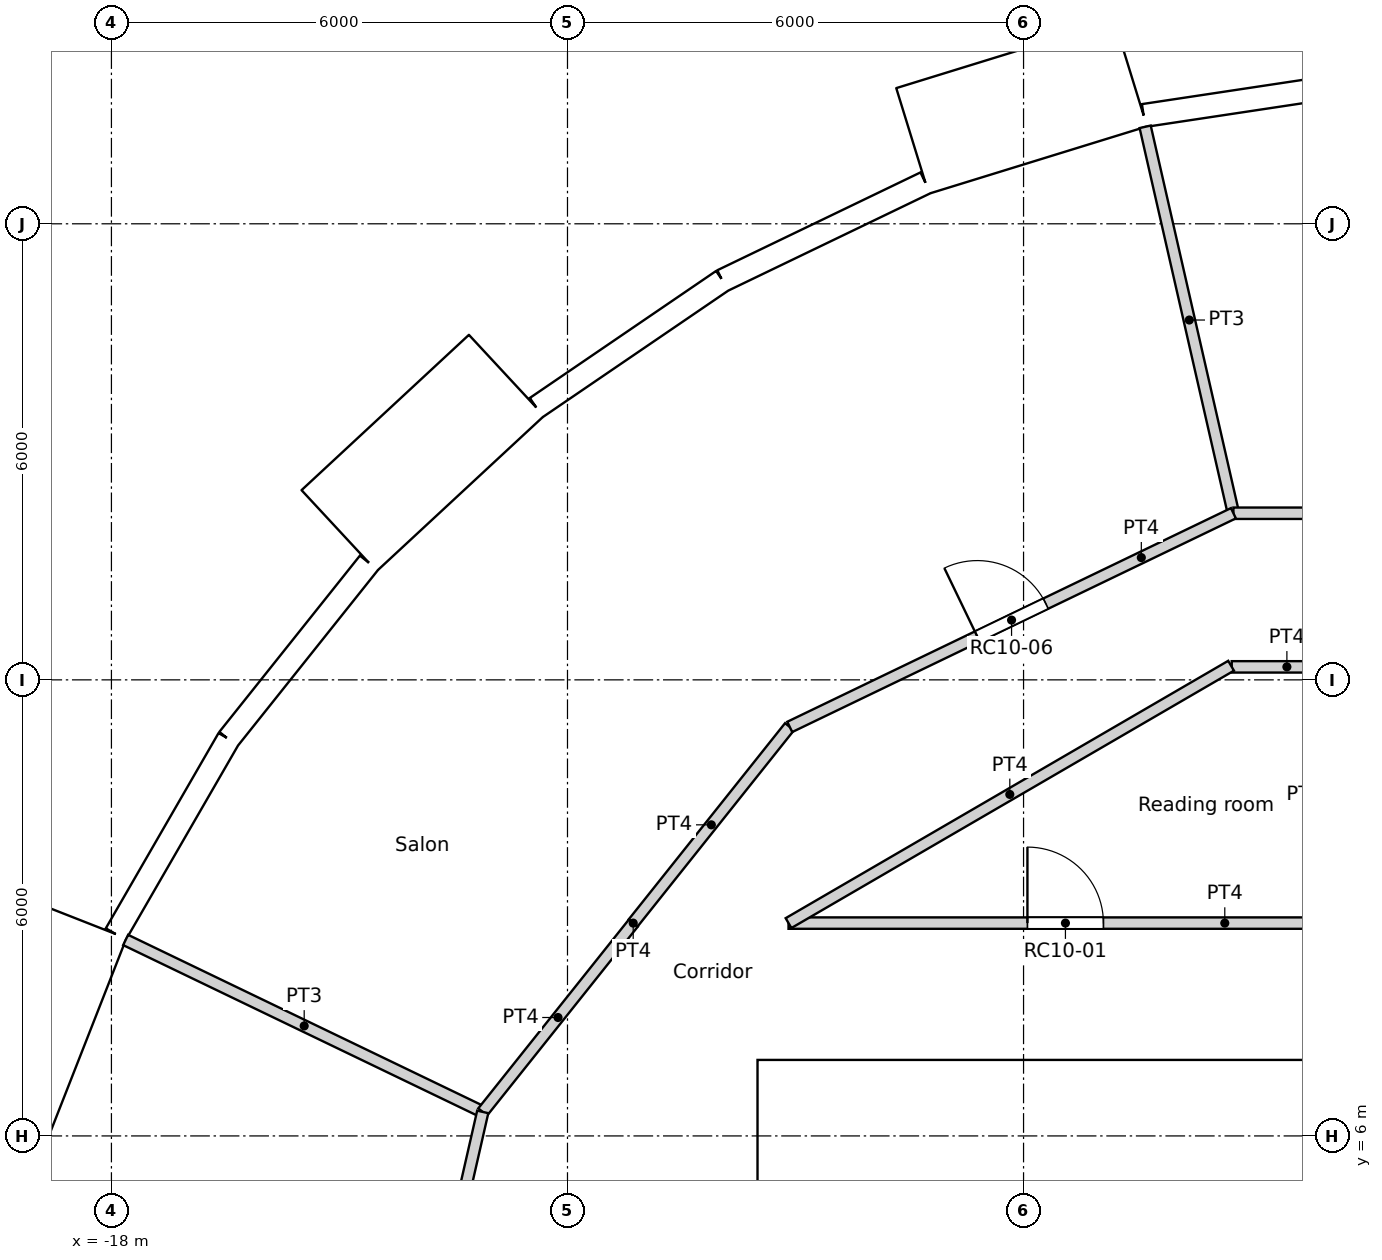
"""IFC4 building model, lengths in metres.
Left out: names, types, materials, properties, quantities, classifications, styles, units other than length and angle.
Written with IfcOpenShell. Run it as: python <this file> out.ifc"""

import sys

from ifc_helpers import new_model, si_unit, direction, frame, frame_2d, origin, origin_2d, place, context, subcontext, project, spatial, rectangle, circle, extrude, element, fill, save


model = new_model("IFC4")
c1 = context("Model", 3, precision=1e-05, world=origin(), true_north=direction((0.0, 1.0)))
c2 = subcontext(c1, "Body", "Model", "MODEL_VIEW")
j1 = project(units=[si_unit("LENGTHUNIT", "METRE"), si_unit("PLANEANGLEUNIT", "RADIAN")], contexts=[c1])
p1 = place(None, origin())
s1 = spatial("IfcSite", under=j1, at=p1, CompositionType="ELEMENT")
p2 = place(p1, origin())
s2 = spatial("IfcBuilding", under=s1, at=p2, CompositionType="ELEMENT")
p3 = place(p2, frame((0.0, 0.0, 323.4)))
s3 = spatial("IfcBuildingStorey", under=s2, at=p3, CompositionType="ELEMENT", Elevation=323.4)
for number, where, z_axis, x_axis in (
    (1, (-4.188, 18.35, 0.0), (0.0, 0.0, 1.0), (1.0, 0.0, 0.0)),
    (2, (-9.411, 16.301, 0.0), (0.0, 0.0, 1.0), (1.0, 0.0, 0.0)),
    (3, (-13.798, 12.802, 0.0), (0.0, 0.0, 1.0), (1.0, 0.0, 0.0)),
    (4, (-16.958, 8.167, 0.0), (0.0, 0.0, 1.0), (1.0, 0.0, 0.0)),
):
    element("IfcColumn", number, at=place(p3, frame(where, z_axis=z_axis, x_axis=x_axis)), inside=s3, PredefinedType="COLUMN", context=c2, shape_type="SweptSolid", body=[
        extrude(circle(Radius=0.45, at=origin_2d()), origin(), (0.0, 0.0, 1.0), 3.6),
    ])
p4 = place(p3, frame((-1.489, 19.866, 0.0), z_axis=(0.0, 0.0, 1.0), x_axis=(-0.988835775663, -0.149009425104, 0.0)))
e5 = element("IfcWall", 5, at=p4, inside=s3, PredefinedType="SOLIDWALL", context=c2, shape_type="SweptSolid", body=[
    extrude(rectangle(XDim=2.962, YDim=0.3, at=frame_2d((1.481, 0.0))), origin(), (0.0, 0.0, 1.0), 3.25),
])
p5 = place(p4, frame((1.481, 0.0, 1.55)))
e6 = element("IfcOpeningElement", 6, at=p5, cuts=e5, PredefinedType="OPENING", context=c2, shape_type="SweptSolid", body=[
    extrude(circle(Radius=0.9, at=origin_2d()), frame((0.0, 0.16, 0.0), z_axis=(0.0, -1.0, 0.0), x_axis=(1.0, 0.0, 0.0)), (0.0, 0.0, 1.0), 0.32),
])
p6 = place(p3, frame((-4.592, 19.975, -0.35), z_axis=(0.0, 0.0, 1.0), x_axis=(-0.955571139978, -0.294760574774, 0.0)))
e7 = element("IfcWall", 7, at=p6, inside=s3, PredefinedType="ELEMENTEDWALL", context=c2, shape_type="SweptSolid", body=[
    extrude(rectangle(XDim=3.0, YDim=1.45, at=frame_2d((1.5, 0.0))), origin(), (0.0, 0.0, 1.0), 3.6),
])
p7 = place(p6, frame((1.5, 0.0, 1.9)))
e8 = element("IfcOpeningElement", 8, at=p7, cuts=e7, PredefinedType="OPENING", context=c2, shape_type="SweptSolid", body=[
    extrude(circle(Radius=0.9, at=origin_2d()), frame((0.0, 0.735, 0.0), z_axis=(0.0, -1.0, 0.0), x_axis=(1.0, 0.0, 0.0)), (0.0, 0.0, 1.0), 1.47),
])
p8 = place(p3, frame((-7.292, 18.538, 0.0), z_axis=(0.0, 0.0, 1.0), x_axis=(-0.90095513435, -0.433912255978, 0.0)))
e9 = element("IfcWall", 9, at=p8, inside=s3, PredefinedType="SOLIDWALL", context=c2, shape_type="SweptSolid", body=[
    extrude(rectangle(XDim=2.962, YDim=0.3, at=frame_2d((1.481, 0.0))), origin(), (0.0, 0.0, 1.0), 3.25),
])
p9 = place(p8, frame((1.481, 0.0, 1.55)))
e10 = element("IfcOpeningElement", 10, at=p9, cuts=e9, PredefinedType="OPENING", context=c2, shape_type="SweptSolid", body=[
    extrude(circle(Radius=0.9, at=origin_2d()), frame((0.0, 0.16, 0.0), z_axis=(0.0, -1.0, 0.0), x_axis=(1.0, 0.0, 0.0)), (0.0, 0.0, 1.0), 0.32),
])
p10 = place(p3, frame((-9.961, 17.253, 0.0), z_axis=(0.0, 0.0, 1.0), x_axis=(-0.826236061068, -0.563324037646, 0.0)))
e11 = element("IfcWall", 11, at=p10, inside=s3, PredefinedType="SOLIDWALL", context=c2, shape_type="SweptSolid", body=[
    extrude(rectangle(XDim=2.962, YDim=0.3, at=frame_2d((1.481, 0.0))), origin(), (0.0, 0.0, 1.0), 3.25),
])
p11 = place(p10, frame((1.481, 0.0, 1.55)))
e12 = element("IfcOpeningElement", 12, at=p11, cuts=e11, PredefinedType="OPENING", context=c2, shape_type="SweptSolid", body=[
    extrude(circle(Radius=0.9, at=origin_2d()), frame((0.0, 0.16, 0.0), z_axis=(0.0, -1.0, 0.0), x_axis=(1.0, 0.0, 0.0)), (0.0, 0.0, 1.0), 0.32),
])
p12 = place(p3, frame((-12.804, 16.005, -0.35), z_axis=(0.0, 0.0, 1.0), x_axis=(-0.733022439167, -0.680204457261, 0.0)))
e13 = element("IfcWall", 13, at=p12, inside=s3, PredefinedType="ELEMENTEDWALL", context=c2, shape_type="SweptSolid", body=[
    extrude(rectangle(XDim=3.0, YDim=1.45, at=frame_2d((1.5, 0.0))), origin(), (0.0, 0.0, 1.0), 3.6),
])
p13 = place(p12, frame((1.5, 0.0, 1.9)))
e14 = element("IfcOpeningElement", 14, at=p13, cuts=e13, PredefinedType="OPENING", context=c2, shape_type="SweptSolid", body=[
    extrude(circle(Radius=0.9, at=origin_2d()), frame((0.0, 0.735, 0.0), z_axis=(0.0, -1.0, 0.0), x_axis=(1.0, 0.0, 0.0)), (0.0, 0.0, 1.0), 1.47),
])
p14 = place(p3, frame((-14.613, 13.538, 0.0), z_axis=(0.0, 0.0, 1.0), x_axis=(-0.623498236992, -0.781824755599, 0.0)))
e15 = element("IfcWall", 15, at=p14, inside=s3, PredefinedType="SOLIDWALL", context=c2, shape_type="SweptSolid", body=[
    extrude(rectangle(XDim=2.962, YDim=0.3, at=frame_2d((1.481, 0.0))), origin(), (0.0, 0.0, 1.0), 3.25),
])
p15 = place(p14, frame((1.481, 0.0, 1.55)))
e16 = element("IfcOpeningElement", 16, at=p15, cuts=e15, PredefinedType="OPENING", context=c2, shape_type="SweptSolid", body=[
    extrude(circle(Radius=0.9, at=origin_2d()), frame((0.0, 0.16, 0.0), z_axis=(0.0, -1.0, 0.0), x_axis=(1.0, 0.0, 0.0)), (0.0, 0.0, 1.0), 0.32),
])
p16 = place(p3, frame((-16.46, 11.222, 0.0), z_axis=(0.0, 0.0, 1.0), x_axis=(-0.499950756475, -0.86605383268, 0.0)))
e17 = element("IfcWall", 17, at=p16, inside=s3, PredefinedType="SOLIDWALL", context=c2, shape_type="SweptSolid", body=[
    extrude(rectangle(XDim=2.962, YDim=0.3, at=frame_2d((1.481, 0.0))), origin(), (0.0, 0.0, 1.0), 3.25),
])
p17 = place(p16, frame((1.481, 0.0, 1.55)))
e18 = element("IfcOpeningElement", 18, at=p17, cuts=e17, PredefinedType="OPENING", context=c2, shape_type="SweptSolid", body=[
    extrude(circle(Radius=0.9, at=origin_2d()), frame((0.0, 0.16, 0.0), z_axis=(0.0, -1.0, 0.0), x_axis=(1.0, 0.0, 0.0)), (0.0, 0.0, 1.0), 0.32),
])
p18 = place(p3, frame((-18.48, 8.864, -0.35), z_axis=(0.0, 0.0, 1.0), x_axis=(-0.36537792632, -0.93085926485, 0.0)))
e19 = element("IfcWall", 19, at=p18, inside=s3, PredefinedType="ELEMENTEDWALL", context=c2, shape_type="SweptSolid", body=[
    extrude(rectangle(XDim=3.0, YDim=1.45, at=frame_2d((1.5, 0.0))), origin(), (0.0, 0.0, 1.0), 3.6),
])
p19 = place(p18, frame((1.5, 0.0, 1.9)))
e20 = element("IfcOpeningElement", 20, at=p19, cuts=e19, PredefinedType="OPENING", context=c2, shape_type="SweptSolid", body=[
    extrude(circle(Radius=0.9, at=origin_2d()), frame((0.0, 0.735, 0.0), z_axis=(0.0, -1.0, 0.0), x_axis=(1.0, 0.0, 0.0)), (0.0, 0.0, 1.0), 1.47),
])
p20 = place(p3, frame((-9.5, 6.7, 0.0), z_axis=(0.0, 0.0, 1.0), x_axis=(1.0, 0.0, 0.0)))
e21 = element("IfcWall", 21, at=p20, inside=s3, PredefinedType="SOLIDWALL", context=c2, shape_type="SweptSolid", body=[
    extrude(rectangle(XDim=19.0, YDim=0.6, at=frame_2d((9.5, 0.0))), origin(), (0.0, 0.0, 1.0), 3.6),
])
p21 = place(p20, frame((5.35, 0.0, 0.0)))
e22 = element("IfcOpeningElement", 22, at=p21, cuts=e21, PredefinedType="OPENING", context=c2, shape_type="SweptSolid", body=[
    extrude(rectangle(XDim=1.7, YDim=2.1, at=frame_2d((0.85, 1.05))), frame((0.0, 0.3, 0.0), z_axis=(0.0, -1.0, 0.0), x_axis=(1.0, 0.0, 0.0)), (0.0, 0.0, 1.0), 0.6),
])
p22 = place(p3, frame((-9.2, -6.4, 0.0), z_axis=(0.0, 0.0, 1.0), x_axis=(0.0, 1.0, 0.0)))
e23 = element("IfcWall", 23, at=p22, inside=s3, PredefinedType="SOLIDWALL", context=c2, shape_type="SweptSolid", body=[
    extrude(rectangle(XDim=12.8, YDim=0.6, at=frame_2d((6.4, 0.0))), origin(), (0.0, 0.0, 1.0), 3.6),
])
p23 = place(p3, frame((-2.25, 3.25, 0.0), z_axis=(0.0, 0.0, 1.0), x_axis=(0.0, 1.0, 0.0)))
e24 = element("IfcWall", 24, at=p23, inside=s3, PredefinedType="SOLIDWALL", context=c2, shape_type="SweptSolid", body=[
    extrude(rectangle(XDim=3.15, YDim=0.3, at=frame_2d((1.575, 0.0))), origin(), (0.0, 0.0, 1.0), 3.25),
])
p24 = place(p3, frame((-9.092, 8.8, 0.0), z_axis=(0.0, 0.0, 1.0), x_axis=(0.864470922103, 0.502682827277, 0.0)))
e25 = element("IfcWall", 25, at=p24, inside=s3, PredefinedType="PARTITIONING", context=c2, shape_type="SweptSolid", body=[
    extrude(rectangle(XDim=6.735, YDim=0.15, at=frame_2d((3.368, 0.0))), origin(), (0.0, 0.0, 1.0), 3.25),
])
p25 = place(p3, frame((-9.092, 8.8, 0.0), z_axis=(0.0, 0.0, 1.0), x_axis=(1.0, 0.0, 0.0)))
e26 = element("IfcWall", 26, at=p25, inside=s3, PredefinedType="PARTITIONING", context=c2, shape_type="SweptSolid", body=[
    extrude(rectangle(XDim=7.286, YDim=0.15, at=frame_2d((3.643, 0.0))), origin(), (0.0, 0.0, 1.0), 3.25),
])
p26 = place(p25, frame((3.143, 0.0, 0.0)))
e27 = element("IfcOpeningElement", 27, at=p26, cuts=e26, PredefinedType="OPENING", context=c2, shape_type="SweptSolid", body=[
    extrude(rectangle(XDim=1.0, YDim=2.04, at=frame_2d((0.5, 1.02))), frame((0.0, 0.075, 0.0), z_axis=(0.0, -1.0, 0.0), x_axis=(1.0, 0.0, 0.0)), (0.0, 0.0, 1.0), 0.15),
])
p27 = place(p3, frame((-11.134, 8.8, 0.0), z_axis=(0.0, 0.0, 1.0), x_axis=(-1.0, 0.0, 0.0)))
e28 = element("IfcWall", 28, at=p27, inside=s3, PredefinedType="PARTITIONING", context=c2, shape_type="SweptSolid", body=[
    extrude(rectangle(XDim=0.003, YDim=0.15, at=frame_2d((0.001, 0.0))), origin(), (0.0, 0.0, 1.0), 3.25),
])
p28 = place(p3, frame((-11.136, 8.802, 0.0), z_axis=(0.0, 0.0, 1.0), x_axis=(0.623151397235, 0.782101231379, 0.0)))
e29 = element("IfcWall", 29, at=p28, inside=s3, PredefinedType="PARTITIONING", context=c2, shape_type="SweptSolid", body=[
    extrude(rectangle(XDim=3.301, YDim=0.15, at=frame_2d((1.65, 0.0))), origin(), (0.0, 0.0, 1.0), 3.25),
])
p29 = place(p3, frame((-3.261, 12.171, 0.0), z_axis=(0.0, 0.0, 1.0), x_axis=(1.0, 0.0, 0.0)))
e30 = element("IfcWall", 30, at=p29, inside=s3, PredefinedType="PARTITIONING", context=c2, shape_type="SweptSolid", body=[
    extrude(rectangle(XDim=1.451, YDim=0.15, at=frame_2d((0.726, 0.0))), origin(), (0.0, 0.0, 1.0), 3.25),
])
p30 = place(p3, frame((-3.239, 14.192, 0.0), z_axis=(0.0, 0.0, 1.0), x_axis=(1.0, 0.0, 0.0)))
e31 = element("IfcWall", 31, at=p30, inside=s3, PredefinedType="PARTITIONING", context=c2, shape_type="SweptSolid", body=[
    extrude(rectangle(XDim=6.478, YDim=0.15, at=frame_2d((3.239, 0.0))), origin(), (0.0, 0.0, 1.0), 3.25),
])
p31 = place(p3, frame((-9.076, 11.381, 0.0), z_axis=(0.0, 0.0, 1.0), x_axis=(0.900976027191, 0.433868872388, 0.0)))
e32 = element("IfcWall", 32, at=p31, inside=s3, PredefinedType="PARTITIONING", context=c2, shape_type="SweptSolid", body=[
    extrude(rectangle(XDim=6.479, YDim=0.15, at=frame_2d((3.239, 0.0))), origin(), (0.0, 0.0, 1.0), 3.25),
])
p32 = place(p31, frame((2.739, 0.0, 0.0)))
e33 = element("IfcOpeningElement", 33, at=p32, cuts=e32, PredefinedType="OPENING", context=c2, shape_type="SweptSolid", body=[
    extrude(rectangle(XDim=1.0, YDim=2.04, at=frame_2d((0.5, 1.02))), frame((0.0, 0.075, 0.0), z_axis=(0.0, -1.0, 0.0), x_axis=(1.0, 0.0, 0.0)), (0.0, 0.0, 1.0), 0.15),
])
p33 = place(p3, frame((-13.115, 6.316, 0.0), z_axis=(0.0, 0.0, 1.0), x_axis=(0.623476099415, 0.781842409606, 0.0)))
e34 = element("IfcWall", 34, at=p33, inside=s3, PredefinedType="PARTITIONING", context=c2, shape_type="SweptSolid", body=[
    extrude(rectangle(XDim=3.177, YDim=0.15, at=frame_2d((1.589, 0.0))), origin(), (0.0, 0.0, 1.0), 3.25),
])
p34 = place(p3, frame((-14.557, 0.0, 0.0), z_axis=(0.0, 0.0, 1.0), x_axis=(0.222568978642, 0.97491694505, 0.0)))
e35 = element("IfcWall", 35, at=p34, inside=s3, PredefinedType="PARTITIONING", context=c2, shape_type="SweptSolid", body=[
    extrude(rectangle(XDim=6.479, YDim=0.15, at=frame_2d((3.239, 0.0))), origin(), (0.0, 0.0, 1.0), 3.25),
])
p35 = place(p3, frame((-4.4, 19.276, 0.0), z_axis=(0.0, 0.0, 1.0), x_axis=(0.222612505682, -0.974907007008, 0.0)))
e36 = element("IfcWall", 36, at=p35, inside=s3, PredefinedType="PARTITIONING", context=c2, shape_type="SweptSolid", body=[
    extrude(rectangle(XDim=5.215, YDim=0.15, at=frame_2d((2.607, 0.0))), origin(), (0.0, 0.0, 1.0), 3.25),
])
p36 = place(p3, frame((-17.813, 8.578, 0.0), z_axis=(0.0, 0.0, 1.0), x_axis=(0.901004381064, -0.433809987557, 0.0)))
e37 = element("IfcWall", 37, at=p36, inside=s3, PredefinedType="PARTITIONING", context=c2, shape_type="SweptSolid", body=[
    extrude(rectangle(XDim=5.214, YDim=0.15, at=frame_2d((2.607, 0.0))), origin(), (0.0, 0.0, 1.0), 3.25),
])
p37 = place(p5, origin())
e38 = element("IfcWindow", 38, at=p37, inside=s3, PartitioningType="SINGLE_PANEL", PredefinedType="WINDOW", context=c2, shape_type="SweptSolid", body=[
    extrude(circle(Radius=0.9, at=origin_2d()), frame((0.0, 0.12, 0.0), z_axis=(0.0, -1.0, 0.0), x_axis=(1.0, 0.0, 0.0)), (0.0, 0.0, 1.0), 0.1),
])
fill(e6, e38)
p38 = place(p7, origin())
e39 = element("IfcWindow", 39, at=p38, inside=s3, PartitioningType="SINGLE_PANEL", PredefinedType="WINDOW", context=c2, shape_type="SweptSolid", body=[
    extrude(circle(Radius=0.9, at=origin_2d()), frame((0.0, 0.695, 0.0), z_axis=(0.0, -1.0, 0.0), x_axis=(1.0, 0.0, 0.0)), (0.0, 0.0, 1.0), 0.1),
])
fill(e8, e39)
p39 = place(p9, origin())
e40 = element("IfcWindow", 40, at=p39, inside=s3, PartitioningType="SINGLE_PANEL", PredefinedType="WINDOW", context=c2, shape_type="SweptSolid", body=[
    extrude(circle(Radius=0.9, at=origin_2d()), frame((0.0, 0.12, 0.0), z_axis=(0.0, -1.0, 0.0), x_axis=(1.0, 0.0, 0.0)), (0.0, 0.0, 1.0), 0.1),
])
fill(e10, e40)
p40 = place(p11, origin())
e41 = element("IfcWindow", 41, at=p40, inside=s3, PartitioningType="SINGLE_PANEL", PredefinedType="WINDOW", context=c2, shape_type="SweptSolid", body=[
    extrude(circle(Radius=0.9, at=origin_2d()), frame((0.0, 0.12, 0.0), z_axis=(0.0, -1.0, 0.0), x_axis=(1.0, 0.0, 0.0)), (0.0, 0.0, 1.0), 0.1),
])
fill(e12, e41)
p41 = place(p13, origin())
e42 = element("IfcWindow", 42, at=p41, inside=s3, PartitioningType="SINGLE_PANEL", PredefinedType="WINDOW", context=c2, shape_type="SweptSolid", body=[
    extrude(circle(Radius=0.9, at=origin_2d()), frame((0.0, 0.695, 0.0), z_axis=(0.0, -1.0, 0.0), x_axis=(1.0, 0.0, 0.0)), (0.0, 0.0, 1.0), 0.1),
])
fill(e14, e42)
p42 = place(p15, origin())
e43 = element("IfcWindow", 43, at=p42, inside=s3, PartitioningType="SINGLE_PANEL", PredefinedType="WINDOW", context=c2, shape_type="SweptSolid", body=[
    extrude(circle(Radius=0.9, at=origin_2d()), frame((0.0, 0.12, 0.0), z_axis=(0.0, -1.0, 0.0), x_axis=(1.0, 0.0, 0.0)), (0.0, 0.0, 1.0), 0.1),
])
fill(e16, e43)
p43 = place(p17, origin())
e44 = element("IfcWindow", 44, at=p43, inside=s3, PartitioningType="SINGLE_PANEL", PredefinedType="WINDOW", context=c2, shape_type="SweptSolid", body=[
    extrude(circle(Radius=0.9, at=origin_2d()), frame((0.0, 0.12, 0.0), z_axis=(0.0, -1.0, 0.0), x_axis=(1.0, 0.0, 0.0)), (0.0, 0.0, 1.0), 0.1),
])
fill(e18, e44)
p44 = place(p19, origin())
e45 = element("IfcWindow", 45, at=p44, inside=s3, PartitioningType="SINGLE_PANEL", PredefinedType="WINDOW", context=c2, shape_type="SweptSolid", body=[
    extrude(circle(Radius=0.9, at=origin_2d()), frame((0.0, 0.695, 0.0), z_axis=(0.0, -1.0, 0.0), x_axis=(1.0, 0.0, 0.0)), (0.0, 0.0, 1.0), 0.1),
])
fill(e20, e45)
p45 = place(p21, origin())
e46 = element("IfcDoor", 46, at=p45, inside=s3, OperationType="DOUBLE_DOOR_SINGLE_SWING", PredefinedType="DOOR", context=c2, shape_type="SweptSolid", body=[
    extrude(rectangle(XDim=1.7, YDim=2.1, at=frame_2d((0.85, 1.05))), frame((0.0, 0.025, 0.0), z_axis=(0.0, -1.0, 0.0), x_axis=(1.0, 0.0, 0.0)), (0.0, 0.0, 1.0), 0.05),
])
fill(e22, e46)
p46 = place(p26, origin())
e47 = element("IfcDoor", 47, at=p46, inside=s3, OperationType="SINGLE_SWING_LEFT", PredefinedType="DOOR", context=c2, shape_type="SweptSolid", body=[
    extrude(rectangle(XDim=1.0, YDim=2.04, at=frame_2d((0.5, 1.02))), frame((0.0, 0.025, 0.0), z_axis=(0.0, -1.0, 0.0), x_axis=(1.0, 0.0, 0.0)), (0.0, 0.0, 1.0), 0.05),
])
fill(e27, e47)
p47 = place(p32, origin())
e48 = element("IfcDoor", 48, at=p47, inside=s3, OperationType="SINGLE_SWING_LEFT", PredefinedType="DOOR", context=c2, shape_type="SweptSolid", body=[
    extrude(rectangle(XDim=1.0, YDim=2.04, at=frame_2d((0.5, 1.02))), frame((0.0, 0.025, 0.0), z_axis=(0.0, -1.0, 0.0), x_axis=(1.0, 0.0, 0.0)), (0.0, 0.0, 1.0), 0.05),
])
fill(e33, e48)
save(model, sys.argv[1])
